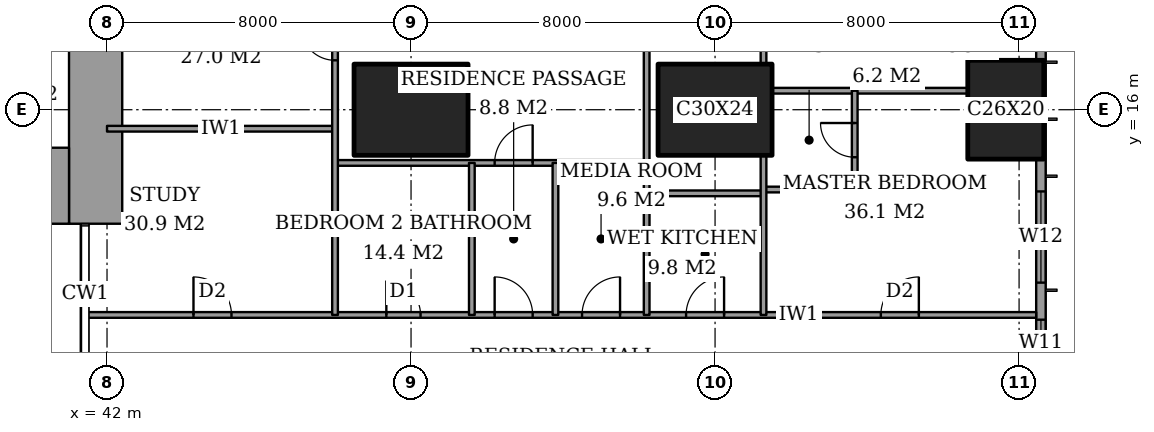
"""IFC4 building model, lengths in metres.
Left out: names, types, materials, properties, quantities, classifications, styles, units other than length and angle.
Written with IfcOpenShell. Run it as: python <this file> out.ifc"""

import sys

from ifc_helpers import new_model, si_unit, direction, frame, frame_2d, origin, origin_2d, place, context, subcontext, project, spatial, rectangle, extrude, element, fill, save


model = new_model("IFC4")
c1 = context("Model", 3, precision=1e-05, world=origin(), true_north=direction((0.0, 1.0)))
c2 = subcontext(c1, "Body", "Model", "MODEL_VIEW")
j1 = project(units=[si_unit("LENGTHUNIT", "METRE"), si_unit("PLANEANGLEUNIT", "RADIAN")], contexts=[c1])
p1 = place(None, origin())
s1 = spatial("IfcSite", under=j1, at=p1, CompositionType="ELEMENT")
p2 = place(p1, origin())
s2 = spatial("IfcBuilding", under=s1, at=p2, CompositionType="ELEMENT")
p3 = place(p2, frame((0.0, 0.0, 114.2)))
s3 = spatial("IfcBuildingStorey", under=s2, at=p3, CompositionType="ELEMENT", Elevation=114.2)
for number, where, z_axis, x_axis in (
    (1, (50.0, 16.0, 0.0), (0.0, 0.0, 1.0), (1.0, 0.0, 0.0)),
    (2, (58.0, 16.0, 0.0), (0.0, 0.0, 1.0), (1.0, 0.0, 0.0)),
):
    element("IfcColumn", number, at=place(p3, frame(where, z_axis=z_axis, x_axis=x_axis)), inside=s3, PredefinedType="COLUMN", context=c2, shape_type="SweptSolid", body=[
        extrude(rectangle(XDim=3.0, YDim=2.4, at=origin_2d()), origin(), (0.0, 0.0, 1.0), 3.6),
    ])
p4 = place(p3, frame((65.65, 16.0, 0.0), z_axis=(0.0, 0.0, 1.0), x_axis=(0.0, 1.0, 0.0)))
e3 = element("IfcColumn", 3, at=p4, inside=s3, PredefinedType="COLUMN", context=c2, shape_type="SweptSolid", body=[
    extrude(rectangle(XDim=2.6, YDim=2.0, at=origin_2d()), origin(), (0.0, 0.0, 1.0), 3.6),
])
p5 = place(p3, frame((37.85, 14.0, 0.0), z_axis=(0.0, 0.0, 1.0), x_axis=(1.0, 0.0, 0.0)))
e4 = element("IfcWall", 4, at=p5, inside=s3, PredefinedType="SHEAR", context=c2, shape_type="SweptSolid", body=[
    extrude(rectangle(XDim=3.15, YDim=2.0, at=frame_2d((1.575, 0.0))), origin(), (0.0, 0.0, 1.0), 3.6),
])
p6 = place(p3, frame((41.7, 13.0, 0.0), z_axis=(0.0, 0.0, 1.0), x_axis=(0.0, 1.0, 0.0)))
e5 = element("IfcWall", 5, at=p6, inside=s3, PredefinedType="SHEAR", context=c2, shape_type="SweptSolid", body=[
    extrude(rectangle(XDim=11.85, YDim=1.4, at=frame_2d((5.925, 0.0))), origin(), (0.0, 0.0, 1.0), 3.6),
])
p7 = place(p6, frame((7.5, 0.0, 0.0)))
e6 = element("IfcOpeningElement", 6, at=p7, cuts=e5, PredefinedType="OPENING", context=c2, shape_type="SweptSolid", body=[
    extrude(rectangle(XDim=1.8, YDim=2.4, at=frame_2d((0.9, 1.2))), frame((0.0, 0.71, 0.0), z_axis=(0.0, -1.0, 0.0), x_axis=(1.0, 0.0, 0.0)), (0.0, 0.0, 1.0), 1.42),
])
p8 = place(p3, frame((66.575, 3.175, 0.0), z_axis=(0.0, 0.0, 1.0), x_axis=(0.0, 1.0, 0.0)))
e7 = element("IfcWall", 7, at=p8, inside=s3, PredefinedType="SOLIDWALL", context=c2, shape_type="SweptSolid", body=[
    extrude(rectangle(XDim=41.65, YDim=0.25, at=frame_2d((20.825, 0.0))), origin(), (0.0, 0.0, 1.0), 3.6),
])
p9 = place(p8, frame((0.775, 0.0, 0.4)))
e8 = element("IfcOpeningElement", 8, at=p9, cuts=e7, PredefinedType="OPENING", context=c2, shape_type="SweptSolid", body=[
    extrude(rectangle(XDim=2.4, YDim=2.2, at=frame_2d((1.2, 1.1))), frame((0.0, 0.135, 0.0), z_axis=(0.0, -1.0, 0.0), x_axis=(1.0, 0.0, 0.0)), (0.0, 0.0, 1.0), 0.27),
])
p10 = place(p8, frame((6.1, 0.0, 0.4)))
e9 = element("IfcOpeningElement", 9, at=p10, cuts=e7, PredefinedType="OPENING", context=c2, shape_type="SweptSolid", body=[
    extrude(rectangle(XDim=1.2, YDim=2.2, at=frame_2d((0.6, 1.1))), frame((0.0, 0.135, 0.0), z_axis=(0.0, -1.0, 0.0), x_axis=(1.0, 0.0, 0.0)), (0.0, 0.0, 1.0), 0.27),
])
p11 = place(p8, frame((8.275, 0.0, 0.4)))
e10 = element("IfcOpeningElement", 10, at=p11, cuts=e7, PredefinedType="OPENING", context=c2, shape_type="SweptSolid", body=[
    extrude(rectangle(XDim=2.4, YDim=2.2, at=frame_2d((1.2, 1.1))), frame((0.0, 0.135, 0.0), z_axis=(0.0, -1.0, 0.0), x_axis=(1.0, 0.0, 0.0)), (0.0, 0.0, 1.0), 0.27),
])
p12 = place(p8, frame((15.775, 0.0, 0.4)))
e11 = element("IfcOpeningElement", 11, at=p12, cuts=e7, PredefinedType="OPENING", context=c2, shape_type="SweptSolid", body=[
    extrude(rectangle(XDim=2.4, YDim=2.2, at=frame_2d((1.2, 1.1))), frame((0.0, 0.135, 0.0), z_axis=(0.0, -1.0, 0.0), x_axis=(1.0, 0.0, 0.0)), (0.0, 0.0, 1.0), 0.27),
])
p13 = place(p8, frame((23.475, 0.0, 0.4)))
e12 = element("IfcOpeningElement", 12, at=p13, cuts=e7, PredefinedType="OPENING", context=c2, shape_type="SweptSolid", body=[
    extrude(rectangle(XDim=2.4, YDim=2.2, at=frame_2d((1.2, 1.1))), frame((0.0, 0.135, 0.0), z_axis=(0.0, -1.0, 0.0), x_axis=(1.0, 0.0, 0.0)), (0.0, 0.0, 1.0), 0.27),
])
p14 = place(p8, frame((30.975, 0.0, 0.4)))
e13 = element("IfcOpeningElement", 13, at=p14, cuts=e7, PredefinedType="OPENING", context=c2, shape_type="SweptSolid", body=[
    extrude(rectangle(XDim=2.4, YDim=2.2, at=frame_2d((1.2, 1.1))), frame((0.0, 0.135, 0.0), z_axis=(0.0, -1.0, 0.0), x_axis=(1.0, 0.0, 0.0)), (0.0, 0.0, 1.0), 0.27),
])
p15 = place(p8, frame((34.5, 0.0, 0.4)))
e14 = element("IfcOpeningElement", 14, at=p15, cuts=e7, PredefinedType="OPENING", context=c2, shape_type="SweptSolid", body=[
    extrude(rectangle(XDim=1.2, YDim=2.2, at=frame_2d((0.6, 1.1))), frame((0.0, 0.135, 0.0), z_axis=(0.0, -1.0, 0.0), x_axis=(1.0, 0.0, 0.0)), (0.0, 0.0, 1.0), 0.27),
])
p16 = place(p8, frame((38.475, 0.0, 0.4)))
e15 = element("IfcOpeningElement", 15, at=p16, cuts=e7, PredefinedType="OPENING", context=c2, shape_type="SweptSolid", body=[
    extrude(rectangle(XDim=2.4, YDim=2.2, at=frame_2d((1.2, 1.1))), frame((0.0, 0.135, 0.0), z_axis=(0.0, -1.0, 0.0), x_axis=(1.0, 0.0, 0.0)), (0.0, 0.0, 1.0), 0.27),
])
p17 = place(p3, frame((41.439, 10.6, 0.0), z_axis=(0.0, 0.0, 1.0), x_axis=(1.0, 0.0, 0.0)))
e16 = element("IfcWall", 16, at=p17, inside=s3, PredefinedType="PARTITIONING", context=c2, shape_type="SweptSolid", body=[
    extrude(rectangle(XDim=25.011, YDim=0.15, at=frame_2d((12.505, 0.0))), origin(), (0.0, 0.0, 1.0), 3.35),
])
p18 = place(p17, frame((10.761, 0.0, 0.0)))
e17 = element("IfcOpeningElement", 17, at=p18, cuts=e16, PredefinedType="OPENING", context=c2, shape_type="SweptSolid", body=[
    extrude(rectangle(XDim=1.0, YDim=2.1, at=frame_2d((0.5, 1.05))), frame((0.0, 0.085, 0.0), z_axis=(0.0, -1.0, 0.0), x_axis=(1.0, 0.0, 0.0)), (0.0, 0.0, 1.0), 0.17),
])
p19 = place(p17, frame((20.924, 0.0, 0.0)))
e18 = element("IfcOpeningElement", 18, at=p19, cuts=e16, PredefinedType="OPENING", context=c2, shape_type="SweptSolid", body=[
    extrude(rectangle(XDim=1.0, YDim=2.1, at=frame_2d((0.5, 1.05))), frame((0.0, 0.085, 0.0), z_axis=(0.0, -1.0, 0.0), x_axis=(1.0, 0.0, 0.0)), (0.0, 0.0, 1.0), 0.17),
])
p20 = place(p17, frame((15.799, 0.0, 0.0)))
e19 = element("IfcOpeningElement", 19, at=p20, cuts=e16, PredefinedType="OPENING", context=c2, shape_type="SweptSolid", body=[
    extrude(rectangle(XDim=1.0, YDim=2.1, at=frame_2d((0.5, 1.05))), frame((0.0, 0.085, 0.0), z_axis=(0.0, -1.0, 0.0), x_axis=(1.0, 0.0, 0.0)), (0.0, 0.0, 1.0), 0.17),
])
p21 = place(p17, frame((13.061, 0.0, 0.0)))
e20 = element("IfcOpeningElement", 20, at=p21, cuts=e16, PredefinedType="OPENING", context=c2, shape_type="SweptSolid", body=[
    extrude(rectangle(XDim=1.0, YDim=2.1, at=frame_2d((0.5, 1.05))), frame((0.0, 0.085, 0.0), z_axis=(0.0, -1.0, 0.0), x_axis=(1.0, 0.0, 0.0)), (0.0, 0.0, 1.0), 0.17),
])
p22 = place(p17, frame((7.911, 0.0, 0.0)))
e21 = element("IfcOpeningElement", 21, at=p22, cuts=e16, PredefinedType="OPENING", context=c2, shape_type="SweptSolid", body=[
    extrude(rectangle(XDim=0.9, YDim=2.1, at=frame_2d((0.45, 1.05))), frame((0.0, 0.085, 0.0), z_axis=(0.0, -1.0, 0.0), x_axis=(1.0, 0.0, 0.0)), (0.0, 0.0, 1.0), 0.17),
])
p23 = place(p17, frame((2.836, 0.0, 0.0)))
e22 = element("IfcOpeningElement", 22, at=p23, cuts=e16, PredefinedType="OPENING", context=c2, shape_type="SweptSolid", body=[
    extrude(rectangle(XDim=1.0, YDim=2.1, at=frame_2d((0.5, 1.05))), frame((0.0, 0.085, 0.0), z_axis=(0.0, -1.0, 0.0), x_axis=(1.0, 0.0, 0.0)), (0.0, 0.0, 1.0), 0.17),
])
p24 = place(p3, frame((56.2, 13.8, 0.0), z_axis=(0.0, 0.0, 1.0), x_axis=(1.0, 0.0, 0.0)))
e23 = element("IfcWall", 23, at=p24, inside=s3, PredefinedType="PARTITIONING", context=c2, shape_type="SweptSolid", body=[
    extrude(rectangle(XDim=3.075, YDim=0.15, at=frame_2d((1.538, 0.0))), origin(), (0.0, 0.0, 1.0), 3.35),
])
p25 = place(p3, frame((59.275, 13.9, 0.0), z_axis=(0.0, 0.0, 1.0), x_axis=(1.0, 0.0, 0.0)))
e24 = element("IfcWall", 24, at=p25, inside=s3, PredefinedType="PARTITIONING", context=c2, shape_type="SweptSolid", body=[
    extrude(rectangle(XDim=2.4, YDim=0.15, at=frame_2d((1.2, 0.0))), origin(), (0.0, 0.0, 1.0), 3.35),
])
p26 = place(p3, frame((48.0, 14.6, 0.0), z_axis=(0.0, 0.0, 1.0), x_axis=(1.0, 0.0, 0.0)))
e25 = element("IfcWall", 25, at=p26, inside=s3, PredefinedType="PARTITIONING", context=c2, shape_type="SweptSolid", body=[
    extrude(rectangle(XDim=8.2, YDim=0.15, at=frame_2d((4.1, 0.0))), origin(), (0.0, 0.0, 1.0), 3.35),
])
p27 = place(p26, frame((4.2, 0.0, 0.0)))
e26 = element("IfcOpeningElement", 26, at=p27, cuts=e25, PredefinedType="OPENING", context=c2, shape_type="SweptSolid", body=[
    extrude(rectangle(XDim=1.0, YDim=2.1, at=frame_2d((0.5, 1.05))), frame((0.0, 0.085, 0.0), z_axis=(0.0, -1.0, 0.0), x_axis=(1.0, 0.0, 0.0)), (0.0, 0.0, 1.0), 0.17),
])
p28 = place(p3, frame((42.0, 15.5, 0.0), z_axis=(0.0, 0.0, 1.0), x_axis=(1.0, 0.0, 0.0)))
e27 = element("IfcWall", 27, at=p28, inside=s3, PredefinedType="PARTITIONING", context=c2, shape_type="SweptSolid", body=[
    extrude(rectangle(XDim=6.0, YDim=0.15, at=frame_2d((3.0, 0.0))), origin(), (0.0, 0.0, 1.0), 3.35),
])
p29 = place(p3, frame((59.5, 16.5, 0.0), z_axis=(0.0, 0.0, 1.0), x_axis=(1.0, 0.0, 0.0)))
e28 = element("IfcWall", 28, at=p29, inside=s3, PredefinedType="PARTITIONING", context=c2, shape_type="SweptSolid", body=[
    extrude(rectangle(XDim=5.15, YDim=0.15, at=frame_2d((2.575, 0.0))), origin(), (0.0, 0.0, 1.0), 3.35),
])
p30 = place(p3, frame((48.0, 10.6, 0.0), z_axis=(0.0, 0.0, 1.0), x_axis=(0.0, 1.0, 0.0)))
e29 = element("IfcWall", 29, at=p30, inside=s3, PredefinedType="PARTITIONING", context=c2, shape_type="SweptSolid", body=[
    extrude(rectangle(XDim=13.4, YDim=0.15, at=frame_2d((6.7, 0.0))), origin(), (0.0, 0.0, 1.0), 3.35),
])
p31 = place(p30, frame((10.8, 0.0, 0.0)))
e30 = element("IfcOpeningElement", 30, at=p31, cuts=e29, PredefinedType="OPENING", context=c2, shape_type="SweptSolid", body=[
    extrude(rectangle(XDim=1.2, YDim=2.4, at=frame_2d((0.6, 1.2))), frame((0.0, 0.085, 0.0), z_axis=(0.0, -1.0, 0.0), x_axis=(1.0, 0.0, 0.0)), (0.0, 0.0, 1.0), 0.17),
])
p32 = place(p30, frame((6.7, 0.0, 0.0)))
e31 = element("IfcOpeningElement", 31, at=p32, cuts=e29, PredefinedType="OPENING", context=c2, shape_type="SweptSolid", body=[
    extrude(rectangle(XDim=0.9, YDim=2.1, at=frame_2d((0.45, 1.05))), frame((0.0, 0.085, 0.0), z_axis=(0.0, -1.0, 0.0), x_axis=(1.0, 0.0, 0.0)), (0.0, 0.0, 1.0), 0.17),
])
for number, where, z_axis, x_axis in (
    (32, (51.6, 10.6, 0.0), (0.0, 0.0, 1.0), (0.0, 1.0, 0.0)),
    (33, (53.8, 10.6, 0.0), (0.0, 0.0, 1.0), (0.0, 1.0, 0.0)),
):
    element("IfcWall", number, at=place(p3, frame(where, z_axis=z_axis, x_axis=x_axis)), inside=s3, PredefinedType="PARTITIONING", context=c2, shape_type="SweptSolid", body=[
        extrude(rectangle(XDim=4.0, YDim=0.15, at=frame_2d((2.0, 0.0))), origin(), (0.0, 0.0, 1.0), 3.35),
    ])
p33 = place(p3, frame((56.2, 10.6, 0.0), z_axis=(0.0, 0.0, 1.0), x_axis=(0.0, 1.0, 0.0)))
e34 = element("IfcWall", 34, at=p33, inside=s3, PredefinedType="PARTITIONING", context=c2, shape_type="SweptSolid", body=[
    extrude(rectangle(XDim=11.0, YDim=0.15, at=frame_2d((5.5, 0.0))), origin(), (0.0, 0.0, 1.0), 3.35),
])
p34 = place(p33, frame((7.0, 0.0, 0.0)))
e35 = element("IfcOpeningElement", 35, at=p34, cuts=e34, PredefinedType="OPENING", context=c2, shape_type="SweptSolid", body=[
    extrude(rectangle(XDim=1.0, YDim=2.1, at=frame_2d((0.5, 1.05))), frame((0.0, 0.085, 0.0), z_axis=(0.0, -1.0, 0.0), x_axis=(1.0, 0.0, 0.0)), (0.0, 0.0, 1.0), 0.17),
])
p35 = place(p3, frame((59.275, 10.6, 0.0), z_axis=(0.0, 0.0, 1.0), x_axis=(0.0, 1.0, 0.0)))
e36 = element("IfcWall", 36, at=p35, inside=s3, PredefinedType="PARTITIONING", context=c2, shape_type="SweptSolid", body=[
    extrude(rectangle(XDim=4.2, YDim=0.15, at=frame_2d((2.1, 0.0))), origin(), (0.0, 0.0, 1.0), 3.35),
])
p36 = place(p3, frame((59.275, 17.2, 0.0), z_axis=(0.0, 0.0, 1.0), x_axis=(0.0, 1.0, 0.0)))
e37 = element("IfcWall", 37, at=p36, inside=s3, PredefinedType="PARTITIONING", context=c2, shape_type="SweptSolid", body=[
    extrude(rectangle(XDim=2.45, YDim=0.15, at=frame_2d((1.225, 0.0))), origin(), (0.0, 0.0, 1.0), 3.35),
])
p37 = place(p36, frame((0.538, 0.0, 0.0)))
e38 = element("IfcOpeningElement", 38, at=p37, cuts=e37, PredefinedType="OPENING", context=c2, shape_type="SweptSolid", body=[
    extrude(rectangle(XDim=1.0, YDim=2.1, at=frame_2d((0.5, 1.05))), frame((0.0, 0.085, 0.0), z_axis=(0.0, -1.0, 0.0), x_axis=(1.0, 0.0, 0.0)), (0.0, 0.0, 1.0), 0.17),
])
p38 = place(p3, frame((61.675, 13.9, 0.0), z_axis=(0.0, 0.0, 1.0), x_axis=(0.0, 1.0, 0.0)))
e39 = element("IfcWall", 39, at=p38, inside=s3, PredefinedType="PARTITIONING", context=c2, shape_type="SweptSolid", body=[
    extrude(rectangle(XDim=2.6, YDim=0.15, at=frame_2d((1.3, 0.0))), origin(), (0.0, 0.0, 1.0), 3.35),
])
p39 = place(p38, frame((0.85, 0.0, 0.0)))
e40 = element("IfcOpeningElement", 40, at=p39, cuts=e39, PredefinedType="OPENING", context=c2, shape_type="SweptSolid", body=[
    extrude(rectangle(XDim=0.9, YDim=2.1, at=frame_2d((0.45, 1.05))), frame((0.0, 0.085, 0.0), z_axis=(0.0, -1.0, 0.0), x_axis=(1.0, 0.0, 0.0)), (0.0, 0.0, 1.0), 0.17),
])
p40 = place(p10, origin())
e41 = element("IfcWindow", 41, at=p40, inside=s3, PartitioningType="SINGLE_PANEL", PredefinedType="WINDOW", context=c2, shape_type="SweptSolid", body=[
    extrude(rectangle(XDim=1.2, YDim=2.2, at=frame_2d((0.6, 1.1))), frame((0.0, 0.03, 0.0), z_axis=(0.0, -1.0, 0.0), x_axis=(1.0, 0.0, 0.0)), (0.0, 0.0, 1.0), 0.06),
])
fill(e9, e41)
p41 = place(p11, origin())
e42 = element("IfcWindow", 42, at=p41, inside=s3, PartitioningType="SINGLE_PANEL", PredefinedType="WINDOW", context=c2, shape_type="SweptSolid", body=[
    extrude(rectangle(XDim=2.4, YDim=2.2, at=frame_2d((1.2, 1.1))), frame((0.0, 0.03, 0.0), z_axis=(0.0, -1.0, 0.0), x_axis=(1.0, 0.0, 0.0)), (0.0, 0.0, 1.0), 0.06),
])
fill(e10, e42)
p42 = place(p18, origin())
e43 = element("IfcDoor", 43, at=p42, inside=s3, OperationType="SINGLE_SWING_RIGHT", PredefinedType="DOOR", context=c2, shape_type="SweptSolid", body=[
    extrude(rectangle(XDim=1.0, YDim=2.1, at=frame_2d((0.5, 1.05))), frame((0.0, 0.025, 0.0), z_axis=(0.0, -1.0, 0.0), x_axis=(1.0, 0.0, 0.0)), (0.0, 0.0, 1.0), 0.05),
])
fill(e17, e43)
p43 = place(p39, origin())
e44 = element("IfcDoor", 44, at=p43, inside=s3, OperationType="SINGLE_SWING_LEFT", PredefinedType="DOOR", context=c2, shape_type="SweptSolid", body=[
    extrude(rectangle(XDim=0.9, YDim=2.1, at=frame_2d((0.45, 1.05))), frame((0.0, 0.025, 0.0), z_axis=(0.0, -1.0, 0.0), x_axis=(1.0, 0.0, 0.0)), (0.0, 0.0, 1.0), 0.05),
])
fill(e40, e44)
p44 = place(p19, origin())
e45 = element("IfcDoor", 45, at=p44, inside=s3, OperationType="SINGLE_SWING_LEFT", PredefinedType="DOOR", context=c2, shape_type="SweptSolid", body=[
    extrude(rectangle(XDim=1.0, YDim=2.1, at=frame_2d((0.5, 1.05))), frame((0.0, 0.025, 0.0), z_axis=(0.0, -1.0, 0.0), x_axis=(1.0, 0.0, 0.0)), (0.0, 0.0, 1.0), 0.05),
])
fill(e18, e45)
p45 = place(p20, origin())
e46 = element("IfcDoor", 46, at=p45, inside=s3, OperationType="SINGLE_SWING_LEFT", PredefinedType="DOOR", context=c2, shape_type="SweptSolid", body=[
    extrude(rectangle(XDim=1.0, YDim=2.1, at=frame_2d((0.5, 1.05))), frame((0.0, 0.025, 0.0), z_axis=(0.0, -1.0, 0.0), x_axis=(1.0, 0.0, 0.0)), (0.0, 0.0, 1.0), 0.05),
])
fill(e19, e46)
p46 = place(p21, origin())
e47 = element("IfcDoor", 47, at=p46, inside=s3, OperationType="SINGLE_SWING_LEFT", PredefinedType="DOOR", context=c2, shape_type="SweptSolid", body=[
    extrude(rectangle(XDim=1.0, YDim=2.1, at=frame_2d((0.5, 1.05))), frame((0.0, 0.025, 0.0), z_axis=(0.0, -1.0, 0.0), x_axis=(1.0, 0.0, 0.0)), (0.0, 0.0, 1.0), 0.05),
])
fill(e20, e47)
p47 = place(p27, origin())
e48 = element("IfcDoor", 48, at=p47, inside=s3, OperationType="SINGLE_SWING_LEFT", PredefinedType="DOOR", context=c2, shape_type="SweptSolid", body=[
    extrude(rectangle(XDim=1.0, YDim=2.1, at=frame_2d((0.5, 1.05))), frame((0.0, 0.025, 0.0), z_axis=(0.0, -1.0, 0.0), x_axis=(1.0, 0.0, 0.0)), (0.0, 0.0, 1.0), 0.05),
])
fill(e26, e48)
p48 = place(p22, origin())
e49 = element("IfcDoor", 49, at=p48, inside=s3, OperationType="SINGLE_SWING_RIGHT", PredefinedType="DOOR", context=c2, shape_type="SweptSolid", body=[
    extrude(rectangle(XDim=0.9, YDim=2.1, at=frame_2d((0.45, 1.05))), frame((0.0, 0.025, 0.0), z_axis=(0.0, -1.0, 0.0), x_axis=(1.0, 0.0, 0.0)), (0.0, 0.0, 1.0), 0.05),
])
fill(e21, e49)
p49 = place(p23, origin())
e50 = element("IfcDoor", 50, at=p49, inside=s3, OperationType="SINGLE_SWING_RIGHT", PredefinedType="DOOR", context=c2, shape_type="SweptSolid", body=[
    extrude(rectangle(XDim=1.0, YDim=2.1, at=frame_2d((0.5, 1.05))), frame((0.0, 0.025, 0.0), z_axis=(0.0, -1.0, 0.0), x_axis=(1.0, 0.0, 0.0)), (0.0, 0.0, 1.0), 0.05),
])
fill(e22, e50)
p50 = place(p32, origin())
e51 = element("IfcDoor", 51, at=p50, inside=s3, OperationType="SINGLE_SWING_LEFT", PredefinedType="DOOR", context=c2, shape_type="SweptSolid", body=[
    extrude(rectangle(XDim=0.9, YDim=2.1, at=frame_2d((0.45, 1.05))), frame((0.0, 0.025, 0.0), z_axis=(0.0, -1.0, 0.0), x_axis=(1.0, 0.0, 0.0)), (0.0, 0.0, 1.0), 0.05),
])
fill(e31, e51)
save(model, sys.argv[1])
